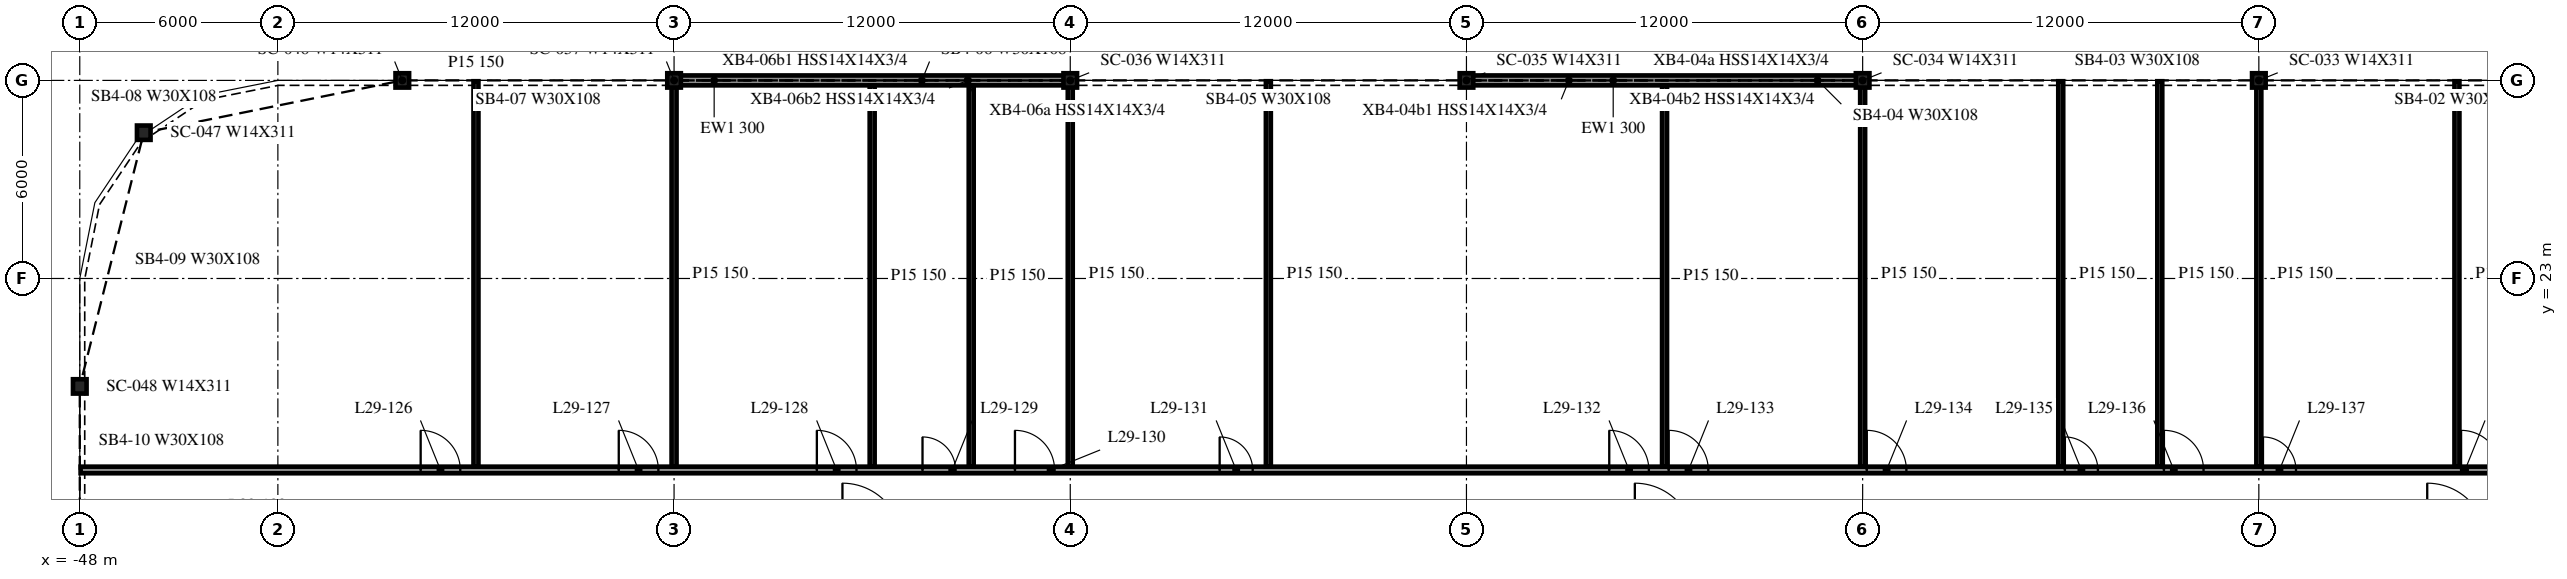
"""IFC4 building model, lengths in metres.
Left out: names, types, materials, properties, quantities, classifications, styles, units other than length and angle.
Written with IfcOpenShell. Run it as: python <this file> out.ifc"""

import sys

from ifc_helpers import new_model, si_unit, direction, frame, frame_2d, origin, origin_2d, place, context, subcontext, project, spatial, rectangle, i_section, extrude, element, fill, save


model = new_model("IFC4")
c1 = context("Model", 3, precision=1e-05, world=origin(), true_north=direction((0.0, 1.0)))
c2 = subcontext(c1, "Body", "Model", "MODEL_VIEW")
j1 = project(units=[si_unit("LENGTHUNIT", "METRE"), si_unit("PLANEANGLEUNIT", "RADIAN")], contexts=[c1])
p1 = place(None, origin())
s1 = spatial("IfcSite", under=j1, at=p1, CompositionType="ELEMENT")
p2 = place(p1, origin())
s2 = spatial("IfcBuilding", under=s1, at=p2, CompositionType="ELEMENT")
p3 = place(p2, frame((0.0, 0.0, 126.1)))
s3 = spatial("IfcBuildingStorey", under=s2, at=p3, CompositionType="ELEMENT", Elevation=126.1)
for number, where, z_axis, x_axis in (
    (1, (18.0, 29.0, -0.34), (0.0, 0.0, 1.0), (1.0, 0.0, 0.0)),
    (2, (6.0, 29.0, -0.34), (0.0, 0.0, 1.0), (1.0, 0.0, 0.0)),
    (3, (-6.0, 29.0, -0.34), (0.0, 0.0, 1.0), (1.0, 0.0, 0.0)),
    (4, (-18.0, 29.0, -0.34), (0.0, 0.0, 1.0), (1.0, 0.0, 0.0)),
    (5, (-30.0, 29.0, -0.34), (0.0, 0.0, 1.0), (1.0, 0.0, 0.0)),
    (6, (-38.231, 29.0, -0.34), (0.0, 0.0, 1.0), (1.0, 0.0, 0.0)),
    (7, (-46.062, 27.416, -0.34), (0.0, 0.0, 1.0), (1.0, 0.0, 0.0)),
    (8, (-48.0, 19.731, -0.34), (0.0, 0.0, 1.0), (1.0, 0.0, 0.0)),
):
    element("IfcColumn", number, at=place(p3, frame(where, z_axis=z_axis, x_axis=x_axis)), inside=s3, PredefinedType="COLUMN", context=c2, shape_type="SweptSolid", body=[
        extrude(i_section(OverallWidth=0.412, OverallDepth=0.434, WebThickness=0.036, FlangeThickness=0.057, at=origin_2d()), origin(), (0.0, 0.0, 1.0), 4.1),
    ])
for number, where, z_axis, x_axis in (
    (9, (5.982, 29.0, 0.0), (0.0, 0.0, 1.0), (-1.0, 0.0, 0.0)),
    (10, (-18.018, 29.0, 0.0), (0.0, 0.0, 1.0), (-1.0, 0.0, 0.0)),
):
    element("IfcWall", number, at=place(p3, frame(where, z_axis=z_axis, x_axis=x_axis)), inside=s3, PredefinedType="NOTDEFINED", context=c2, shape_type="SweptSolid", body=[
        extrude(rectangle(XDim=11.964, YDim=0.3, at=frame_2d((5.982, 0.0))), origin(), (0.0, 0.0, 1.0), 3.003),
    ])
p4 = place(p3, frame((-47.975, 17.2, 0.0), z_axis=(0.0, 0.0, 1.0), x_axis=(1.0, 0.0, 0.0)))
e11 = element("IfcWall", 11, at=p4, inside=s3, PredefinedType="PARTITIONING", context=c2, shape_type="SweptSolid", body=[
    extrude(rectangle(XDim=95.95, YDim=0.2, at=frame_2d((47.975, 0.0))), origin(), (0.0, 0.0, 1.0), 3.76),
])
p5 = place(p4, frame((10.3, 0.0, 0.0)))
e12 = element("IfcOpeningElement", 12, at=p5, cuts=e11, PredefinedType="OPENING", context=c2, shape_type="SweptSolid", body=[
    extrude(rectangle(XDim=1.2, YDim=2.1, at=frame_2d((0.6, 1.05))), frame((0.0, 0.11, 0.0), z_axis=(0.0, -1.0, 0.0), x_axis=(1.0, 0.0, 0.0)), (0.0, 0.0, 1.0), 0.22),
])
p6 = place(p4, frame((16.3, 0.0, 0.0)))
e13 = element("IfcOpeningElement", 13, at=p6, cuts=e11, PredefinedType="OPENING", context=c2, shape_type="SweptSolid", body=[
    extrude(rectangle(XDim=1.2, YDim=2.1, at=frame_2d((0.6, 1.05))), frame((0.0, 0.11, 0.0), z_axis=(0.0, -1.0, 0.0), x_axis=(1.0, 0.0, 0.0)), (0.0, 0.0, 1.0), 0.22),
])
p7 = place(p4, frame((22.3, 0.0, 0.0)))
e14 = element("IfcOpeningElement", 14, at=p7, cuts=e11, PredefinedType="OPENING", context=c2, shape_type="SweptSolid", body=[
    extrude(rectangle(XDim=1.2, YDim=2.1, at=frame_2d((0.6, 1.05))), frame((0.0, 0.11, 0.0), z_axis=(0.0, -1.0, 0.0), x_axis=(1.0, 0.0, 0.0)), (0.0, 0.0, 1.0), 0.22),
])
p8 = place(p4, frame((25.5, 0.0, 0.0)))
e15 = element("IfcOpeningElement", 15, at=p8, cuts=e11, PredefinedType="OPENING", context=c2, shape_type="SweptSolid", body=[
    extrude(rectangle(XDim=1.0, YDim=2.1, at=frame_2d((0.5, 1.05))), frame((0.0, 0.11, 0.0), z_axis=(0.0, -1.0, 0.0), x_axis=(1.0, 0.0, 0.0)), (0.0, 0.0, 1.0), 0.22),
])
p9 = place(p4, frame((28.3, 0.0, 0.0)))
e16 = element("IfcOpeningElement", 16, at=p9, cuts=e11, PredefinedType="OPENING", context=c2, shape_type="SweptSolid", body=[
    extrude(rectangle(XDim=1.2, YDim=2.1, at=frame_2d((0.6, 1.05))), frame((0.0, 0.11, 0.0), z_axis=(0.0, -1.0, 0.0), x_axis=(1.0, 0.0, 0.0)), (0.0, 0.0, 1.0), 0.22),
])
p10 = place(p4, frame((34.5, 0.0, 0.0)))
e17 = element("IfcOpeningElement", 17, at=p10, cuts=e11, PredefinedType="OPENING", context=c2, shape_type="SweptSolid", body=[
    extrude(rectangle(XDim=1.0, YDim=2.1, at=frame_2d((0.5, 1.05))), frame((0.0, 0.11, 0.0), z_axis=(0.0, -1.0, 0.0), x_axis=(1.0, 0.0, 0.0)), (0.0, 0.0, 1.0), 0.22),
])
p11 = place(p4, frame((46.3, 0.0, 0.0)))
e18 = element("IfcOpeningElement", 18, at=p11, cuts=e11, PredefinedType="OPENING", context=c2, shape_type="SweptSolid", body=[
    extrude(rectangle(XDim=1.2, YDim=2.1, at=frame_2d((0.6, 1.05))), frame((0.0, 0.11, 0.0), z_axis=(0.0, -1.0, 0.0), x_axis=(1.0, 0.0, 0.0)), (0.0, 0.0, 1.0), 0.22),
])
p12 = place(p4, frame((48.1, 0.0, 0.0)))
e19 = element("IfcOpeningElement", 19, at=p12, cuts=e11, PredefinedType="OPENING", context=c2, shape_type="SweptSolid", body=[
    extrude(rectangle(XDim=1.2, YDim=2.1, at=frame_2d((0.6, 1.05))), frame((0.0, 0.11, 0.0), z_axis=(0.0, -1.0, 0.0), x_axis=(1.0, 0.0, 0.0)), (0.0, 0.0, 1.0), 0.22),
])
p13 = place(p4, frame((54.1, 0.0, 0.0)))
e20 = element("IfcOpeningElement", 20, at=p13, cuts=e11, PredefinedType="OPENING", context=c2, shape_type="SweptSolid", body=[
    extrude(rectangle(XDim=1.2, YDim=2.1, at=frame_2d((0.6, 1.05))), frame((0.0, 0.11, 0.0), z_axis=(0.0, -1.0, 0.0), x_axis=(1.0, 0.0, 0.0)), (0.0, 0.0, 1.0), 0.22),
])
p14 = place(p4, frame((60.1, 0.0, 0.0)))
e21 = element("IfcOpeningElement", 21, at=p14, cuts=e11, PredefinedType="OPENING", context=c2, shape_type="SweptSolid", body=[
    extrude(rectangle(XDim=1.0, YDim=2.1, at=frame_2d((0.5, 1.05))), frame((0.0, 0.11, 0.0), z_axis=(0.0, -1.0, 0.0), x_axis=(1.0, 0.0, 0.0)), (0.0, 0.0, 1.0), 0.22),
])
p15 = place(p4, frame((63.1, 0.0, 0.0)))
e22 = element("IfcOpeningElement", 22, at=p15, cuts=e11, PredefinedType="OPENING", context=c2, shape_type="SweptSolid", body=[
    extrude(rectangle(XDim=1.2, YDim=2.1, at=frame_2d((0.6, 1.05))), frame((0.0, 0.11, 0.0), z_axis=(0.0, -1.0, 0.0), x_axis=(1.0, 0.0, 0.0)), (0.0, 0.0, 1.0), 0.22),
])
p16 = place(p4, frame((66.1, 0.0, 0.0)))
e23 = element("IfcOpeningElement", 23, at=p16, cuts=e11, PredefinedType="OPENING", context=c2, shape_type="SweptSolid", body=[
    extrude(rectangle(XDim=1.0, YDim=2.1, at=frame_2d((0.5, 1.05))), frame((0.0, 0.11, 0.0), z_axis=(0.0, -1.0, 0.0), x_axis=(1.0, 0.0, 0.0)), (0.0, 0.0, 1.0), 0.22),
])
p17 = place(p4, frame((72.1, 0.0, 0.0)))
e24 = element("IfcOpeningElement", 24, at=p17, cuts=e11, PredefinedType="OPENING", context=c2, shape_type="SweptSolid", body=[
    extrude(rectangle(XDim=1.2, YDim=2.1, at=frame_2d((0.6, 1.05))), frame((0.0, 0.11, 0.0), z_axis=(0.0, -1.0, 0.0), x_axis=(1.0, 0.0, 0.0)), (0.0, 0.0, 1.0), 0.22),
])
p18 = place(p4, frame((84.1, 0.0, 0.0)))
e25 = element("IfcOpeningElement", 25, at=p18, cuts=e11, PredefinedType="OPENING", context=c2, shape_type="SweptSolid", body=[
    extrude(rectangle(XDim=1.2, YDim=2.1, at=frame_2d((0.6, 1.05))), frame((0.0, 0.11, 0.0), z_axis=(0.0, -1.0, 0.0), x_axis=(1.0, 0.0, 0.0)), (0.0, 0.0, 1.0), 0.22),
])
p19 = place(p4, frame((90.1, 0.0, 0.0)))
e26 = element("IfcOpeningElement", 26, at=p19, cuts=e11, PredefinedType="OPENING", context=c2, shape_type="SweptSolid", body=[
    extrude(rectangle(XDim=1.2, YDim=2.1, at=frame_2d((0.6, 1.05))), frame((0.0, 0.11, 0.0), z_axis=(0.0, -1.0, 0.0), x_axis=(1.0, 0.0, 0.0)), (0.0, 0.0, 1.0), 0.22),
])
for number, where, z_axis, x_axis in (
    (27, (-36.0, 17.3, 0.0), (0.0, 0.0, 1.0), (0.0, 1.0, 0.0)),
    (28, (-30.0, 17.3, 0.0), (0.0, 0.0, 1.0), (0.0, 1.0, 0.0)),
):
    element("IfcWall", number, at=place(p3, frame(where, z_axis=z_axis, x_axis=x_axis)), inside=s3, PredefinedType="PARTITIONING", context=c2, shape_type="SweptSolid", body=[
        extrude(rectangle(XDim=11.675, YDim=0.15, at=frame_2d((5.837, 0.0))), origin(), (0.0, 0.0, 1.0), 3.76),
    ])
for number, where, z_axis, x_axis in (
    (29, (-24.0, 17.3, 0.0), (0.0, 0.0, 1.0), (0.0, 1.0, 0.0)),
    (30, (-21.0, 17.3, 0.0), (0.0, 0.0, 1.0), (0.0, 1.0, 0.0)),
):
    element("IfcWall", number, at=place(p3, frame(where, z_axis=z_axis, x_axis=x_axis)), inside=s3, PredefinedType="PARTITIONING", context=c2, shape_type="SweptSolid", body=[
        extrude(rectangle(XDim=11.55, YDim=0.15, at=frame_2d((5.775, 0.0))), origin(), (0.0, 0.0, 1.0), 3.76),
    ])
for number, where, z_axis, x_axis in (
    (31, (-18.0, 17.3, 0.0), (0.0, 0.0, 1.0), (0.0, 1.0, 0.0)),
    (32, (-12.0, 17.3, 0.0), (0.0, 0.0, 1.0), (0.0, 1.0, 0.0)),
):
    element("IfcWall", number, at=place(p3, frame(where, z_axis=z_axis, x_axis=x_axis)), inside=s3, PredefinedType="PARTITIONING", context=c2, shape_type="SweptSolid", body=[
        extrude(rectangle(XDim=11.675, YDim=0.15, at=frame_2d((5.837, 0.0))), origin(), (0.0, 0.0, 1.0), 3.76),
    ])
p20 = place(p3, frame((0.0, 17.3, 0.0), z_axis=(0.0, 0.0, 1.0), x_axis=(0.0, 1.0, 0.0)))
e33 = element("IfcWall", 33, at=p20, inside=s3, PredefinedType="PARTITIONING", context=c2, shape_type="SweptSolid", body=[
    extrude(rectangle(XDim=11.55, YDim=0.15, at=frame_2d((5.775, 0.0))), origin(), (0.0, 0.0, 1.0), 3.76),
])
for number, where, z_axis, x_axis in (
    (34, (6.0, 17.3, 0.0), (0.0, 0.0, 1.0), (0.0, 1.0, 0.0)),
    (35, (12.0, 17.3, 0.0), (0.0, 0.0, 1.0), (0.0, 1.0, 0.0)),
    (36, (15.0, 17.3, 0.0), (0.0, 0.0, 1.0), (0.0, 1.0, 0.0)),
    (37, (18.0, 17.3, 0.0), (0.0, 0.0, 1.0), (0.0, 1.0, 0.0)),
    (38, (24.0, 17.3, 0.0), (0.0, 0.0, 1.0), (0.0, 1.0, 0.0)),
):
    element("IfcWall", number, at=place(p3, frame(where, z_axis=z_axis, x_axis=x_axis)), inside=s3, PredefinedType="PARTITIONING", context=c2, shape_type="SweptSolid", body=[
        extrude(rectangle(XDim=11.675, YDim=0.15, at=frame_2d((5.837, 0.0))), origin(), (0.0, 0.0, 1.0), 3.76),
    ])
p21 = place(p5, origin())
e39 = element("IfcDoor", 39, at=p21, inside=s3, OperationType="SINGLE_SWING_LEFT", PredefinedType="DOOR", context=c2, shape_type="SweptSolid", body=[
    extrude(rectangle(XDim=1.2, YDim=2.1, at=frame_2d((0.6, 1.05))), frame((0.0, 0.025, 0.0), z_axis=(0.0, -1.0, 0.0), x_axis=(1.0, 0.0, 0.0)), (0.0, 0.0, 1.0), 0.05),
])
fill(e12, e39)
p22 = place(p6, origin())
e40 = element("IfcDoor", 40, at=p22, inside=s3, OperationType="SINGLE_SWING_LEFT", PredefinedType="DOOR", context=c2, shape_type="SweptSolid", body=[
    extrude(rectangle(XDim=1.2, YDim=2.1, at=frame_2d((0.6, 1.05))), frame((0.0, 0.025, 0.0), z_axis=(0.0, -1.0, 0.0), x_axis=(1.0, 0.0, 0.0)), (0.0, 0.0, 1.0), 0.05),
])
fill(e13, e40)
p23 = place(p7, origin())
e41 = element("IfcDoor", 41, at=p23, inside=s3, OperationType="SINGLE_SWING_LEFT", PredefinedType="DOOR", context=c2, shape_type="SweptSolid", body=[
    extrude(rectangle(XDim=1.2, YDim=2.1, at=frame_2d((0.6, 1.05))), frame((0.0, 0.025, 0.0), z_axis=(0.0, -1.0, 0.0), x_axis=(1.0, 0.0, 0.0)), (0.0, 0.0, 1.0), 0.05),
])
fill(e14, e41)
p24 = place(p8, origin())
e42 = element("IfcDoor", 42, at=p24, inside=s3, OperationType="SINGLE_SWING_LEFT", PredefinedType="DOOR", context=c2, shape_type="SweptSolid", body=[
    extrude(rectangle(XDim=1.0, YDim=2.1, at=frame_2d((0.5, 1.05))), frame((0.0, 0.025, 0.0), z_axis=(0.0, -1.0, 0.0), x_axis=(1.0, 0.0, 0.0)), (0.0, 0.0, 1.0), 0.05),
])
fill(e15, e42)
p25 = place(p9, origin())
e43 = element("IfcDoor", 43, at=p25, inside=s3, OperationType="SINGLE_SWING_LEFT", PredefinedType="DOOR", context=c2, shape_type="SweptSolid", body=[
    extrude(rectangle(XDim=1.2, YDim=2.1, at=frame_2d((0.6, 1.05))), frame((0.0, 0.025, 0.0), z_axis=(0.0, -1.0, 0.0), x_axis=(1.0, 0.0, 0.0)), (0.0, 0.0, 1.0), 0.05),
])
fill(e16, e43)
p26 = place(p10, origin())
e44 = element("IfcDoor", 44, at=p26, inside=s3, OperationType="SINGLE_SWING_LEFT", PredefinedType="DOOR", context=c2, shape_type="SweptSolid", body=[
    extrude(rectangle(XDim=1.0, YDim=2.1, at=frame_2d((0.5, 1.05))), frame((0.0, 0.025, 0.0), z_axis=(0.0, -1.0, 0.0), x_axis=(1.0, 0.0, 0.0)), (0.0, 0.0, 1.0), 0.05),
])
fill(e17, e44)
p27 = place(p11, origin())
e45 = element("IfcDoor", 45, at=p27, inside=s3, OperationType="SINGLE_SWING_LEFT", PredefinedType="DOOR", context=c2, shape_type="SweptSolid", body=[
    extrude(rectangle(XDim=1.2, YDim=2.1, at=frame_2d((0.6, 1.05))), frame((0.0, 0.025, 0.0), z_axis=(0.0, -1.0, 0.0), x_axis=(1.0, 0.0, 0.0)), (0.0, 0.0, 1.0), 0.05),
])
fill(e18, e45)
p28 = place(p12, origin())
e46 = element("IfcDoor", 46, at=p28, inside=s3, OperationType="SINGLE_SWING_RIGHT", PredefinedType="DOOR", context=c2, shape_type="SweptSolid", body=[
    extrude(rectangle(XDim=1.2, YDim=2.1, at=frame_2d((0.6, 1.05))), frame((0.0, 0.025, 0.0), z_axis=(0.0, -1.0, 0.0), x_axis=(1.0, 0.0, 0.0)), (0.0, 0.0, 1.0), 0.05),
])
fill(e19, e46)
p29 = place(p13, origin())
e47 = element("IfcDoor", 47, at=p29, inside=s3, OperationType="SINGLE_SWING_RIGHT", PredefinedType="DOOR", context=c2, shape_type="SweptSolid", body=[
    extrude(rectangle(XDim=1.2, YDim=2.1, at=frame_2d((0.6, 1.05))), frame((0.0, 0.025, 0.0), z_axis=(0.0, -1.0, 0.0), x_axis=(1.0, 0.0, 0.0)), (0.0, 0.0, 1.0), 0.05),
])
fill(e20, e47)
p30 = place(p14, origin())
e48 = element("IfcDoor", 48, at=p30, inside=s3, OperationType="SINGLE_SWING_RIGHT", PredefinedType="DOOR", context=c2, shape_type="SweptSolid", body=[
    extrude(rectangle(XDim=1.0, YDim=2.1, at=frame_2d((0.5, 1.05))), frame((0.0, 0.025, 0.0), z_axis=(0.0, -1.0, 0.0), x_axis=(1.0, 0.0, 0.0)), (0.0, 0.0, 1.0), 0.05),
])
fill(e21, e48)
p31 = place(p15, origin())
e49 = element("IfcDoor", 49, at=p31, inside=s3, OperationType="SINGLE_SWING_RIGHT", PredefinedType="DOOR", context=c2, shape_type="SweptSolid", body=[
    extrude(rectangle(XDim=1.2, YDim=2.1, at=frame_2d((0.6, 1.05))), frame((0.0, 0.025, 0.0), z_axis=(0.0, -1.0, 0.0), x_axis=(1.0, 0.0, 0.0)), (0.0, 0.0, 1.0), 0.05),
])
fill(e22, e49)
p32 = place(p16, origin())
e50 = element("IfcDoor", 50, at=p32, inside=s3, OperationType="SINGLE_SWING_RIGHT", PredefinedType="DOOR", context=c2, shape_type="SweptSolid", body=[
    extrude(rectangle(XDim=1.0, YDim=2.1, at=frame_2d((0.5, 1.05))), frame((0.0, 0.025, 0.0), z_axis=(0.0, -1.0, 0.0), x_axis=(1.0, 0.0, 0.0)), (0.0, 0.0, 1.0), 0.05),
])
fill(e23, e50)
p33 = place(p17, origin())
e51 = element("IfcDoor", 51, at=p33, inside=s3, OperationType="SINGLE_SWING_RIGHT", PredefinedType="DOOR", context=c2, shape_type="SweptSolid", body=[
    extrude(rectangle(XDim=1.2, YDim=2.1, at=frame_2d((0.6, 1.05))), frame((0.0, 0.025, 0.0), z_axis=(0.0, -1.0, 0.0), x_axis=(1.0, 0.0, 0.0)), (0.0, 0.0, 1.0), 0.05),
])
fill(e24, e51)
save(model, sys.argv[1])
